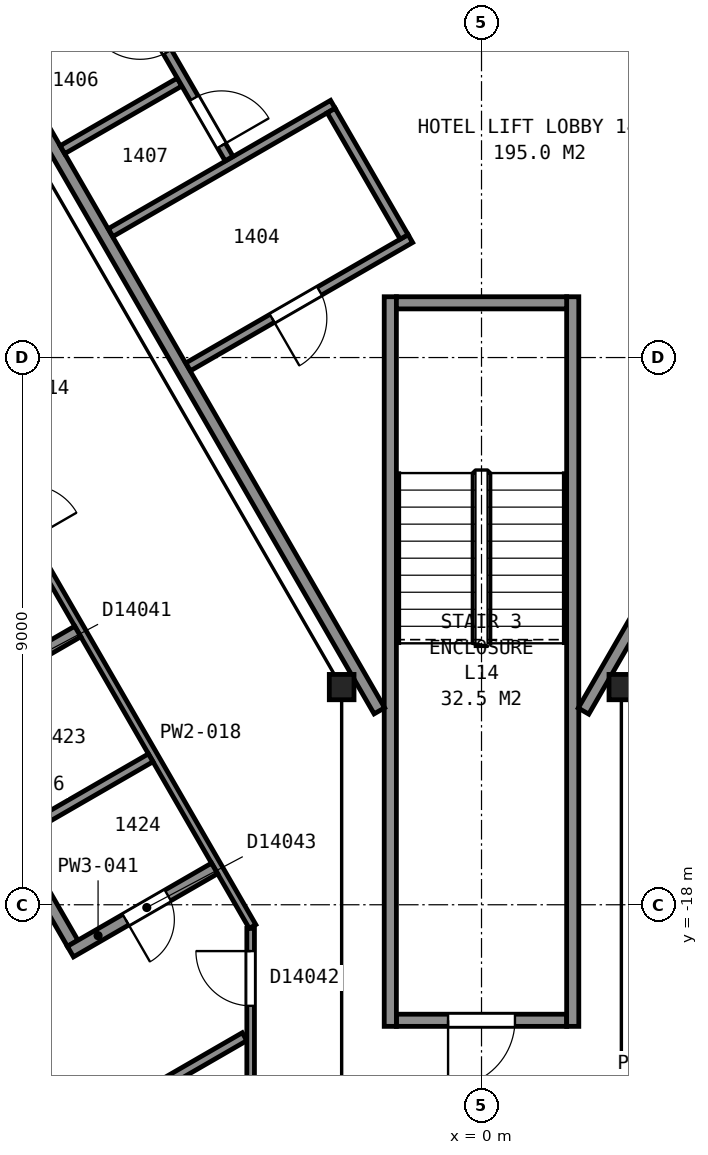
"""IFC4 building model, lengths in metres.
Left out: names, types, materials, properties, quantities, classifications, styles, units other than length and angle.
Written with IfcOpenShell. Run it as: python <this file> out.ifc"""

import sys

from ifc_helpers import new_model, si_unit, direction, frame, frame_2d, origin, origin_2d, place, context, subcontext, project, spatial, rectangle, i_section, extrude, element, fill, save


model = new_model("IFC4")
c1 = context("Model", 3, precision=1e-05, world=origin(), true_north=direction((0.0, 1.0)))
c2 = subcontext(c1, "Body", "Model", "MODEL_VIEW")
j1 = project(units=[si_unit("LENGTHUNIT", "METRE"), si_unit("PLANEANGLEUNIT", "RADIAN")], contexts=[c1])
p1 = place(None, origin())
s1 = spatial("IfcSite", under=j1, at=p1, CompositionType="ELEMENT")
p2 = place(p1, origin())
s2 = spatial("IfcBuilding", under=s1, at=p2, CompositionType="ELEMENT")
p3 = place(p2, frame((0.0, 0.0, 65.6)))
s3 = spatial("IfcBuildingStorey", under=s2, at=p3, CompositionType="ELEMENT", Elevation=65.6)
for number, where, z_axis, x_axis in (
    (1, (-2.3, -14.42, 0.0), (0.0, 0.0, 1.0), (1.0, 0.0, 0.0)),
    (2, (2.3, -14.42, 0.0), (0.0, 0.0, 1.0), (1.0, 0.0, 0.0)),
):
    element("IfcColumn", number, at=place(p3, frame(where, z_axis=z_axis, x_axis=x_axis)), inside=s3, PredefinedType="COLUMN", context=c2, shape_type="SweptSolid", body=[
        extrude(i_section(OverallWidth=0.406, OverallDepth=0.417, WebThickness=0.03, FlangeThickness=0.048, FilletRadius=0.015, at=origin_2d()), origin(), (0.0, 0.0, 1.0), 3.6),
    ])
p4 = place(p3, frame((-1.4, -19.9, 0.0), z_axis=(0.0, 0.0, 1.0), x_axis=(1.0, 0.0, 0.0)))
e3 = element("IfcWall", 3, at=p4, inside=s3, PredefinedType="PARTITIONING", context=c2, shape_type="SweptSolid", body=[
    extrude(rectangle(XDim=2.8, YDim=0.2, at=frame_2d((1.4, 0.0))), origin(), (0.0, 0.0, 1.0), 3.35),
])
p5 = place(p4, frame((0.85, 0.0, 0.0)))
e4 = element("IfcOpeningElement", 4, at=p5, cuts=e3, PredefinedType="OPENING", context=c2, shape_type="SweptSolid", body=[
    extrude(rectangle(XDim=1.1, YDim=2.1, at=frame_2d((0.55, 1.05))), frame((0.0, 0.11, 0.0), z_axis=(0.0, -1.0, 0.0), x_axis=(1.0, 0.0, 0.0)), (0.0, 0.0, 1.0), 0.22),
])
for number, where, z_axis, x_axis in (
    (5, (1.5, -8.0, 0.0), (0.0, 0.0, 1.0), (0.0, -1.0, 0.0)),
    (6, (-1.5, -8.0, 0.0), (0.0, 0.0, 1.0), (0.0, -1.0, 0.0)),
):
    element("IfcWall", number, at=place(p3, frame(where, z_axis=z_axis, x_axis=x_axis)), inside=s3, PredefinedType="PARTITIONING", context=c2, shape_type="SweptSolid", body=[
        extrude(rectangle(XDim=12.0, YDim=0.2, at=frame_2d((6.0, 0.0))), origin(), (0.0, 0.0, 1.0), 3.35),
    ])
p6 = place(p3, frame((-1.4, -8.1, 0.0), z_axis=(0.0, 0.0, 1.0), x_axis=(1.0, 0.0, 0.0)))
e7 = element("IfcWall", 7, at=p6, inside=s3, PredefinedType="PARTITIONING", context=c2, shape_type="SweptSolid", body=[
    extrude(rectangle(XDim=2.8, YDim=0.2, at=frame_2d((1.4, 0.0))), origin(), (0.0, 0.0, 1.0), 3.35),
])
p7 = place(p3, frame((-13.664, 5.946, 0.0), z_axis=(0.0, 0.0, 1.0), x_axis=(0.499994327219, -0.866028678941, 0.0)))
e8 = element("IfcWall", 8, at=p7, inside=s3, PredefinedType="PARTITIONING", context=c2, shape_type="SweptSolid", body=[
    extrude(rectangle(XDim=23.968, YDim=0.2, at=frame_2d((11.984, 0.0))), origin(), (0.0, 0.0, 1.0), 3.35),
])
p8 = place(p3, frame((-7.856, -3.912, 0.0), z_axis=(0.0, 0.0, 1.0), x_axis=(0.865971748, 0.500092923031, 0.0)))
e9 = element("IfcWall", 9, at=p8, inside=s3, PredefinedType="PARTITIONING", context=c2, shape_type="SweptSolid", body=[
    extrude(rectangle(XDim=2.225, YDim=0.15, at=frame_2d((1.112, 0.0))), origin(), (0.0, 0.0, 1.0), 3.35),
])
p9 = place(p3, frame((-6.892, -5.582, 0.0), z_axis=(0.0, 0.0, 1.0), x_axis=(0.865944298464, 0.500140452231, 0.0)))
e10 = element("IfcWall", 10, at=p9, inside=s3, PredefinedType="PARTITIONING", context=c2, shape_type="SweptSolid", body=[
    extrude(rectangle(XDim=2.224, YDim=0.15, at=frame_2d((1.112, 0.0))), origin(), (0.0, 0.0, 1.0), 3.35),
])
p10 = place(p3, frame((-6.1, -6.946, 0.0), z_axis=(0.0, 0.0, 1.0), x_axis=(0.866038200431, 0.499977834903, 0.0)))
e11 = element("IfcWall", 11, at=p10, inside=s3, PredefinedType="PARTITIONING", context=c2, shape_type="SweptSolid", body=[
    extrude(rectangle(XDim=4.22, YDim=0.15, at=frame_2d((2.11, 0.0))), origin(), (0.0, 0.0, 1.0), 3.35),
])
p11 = place(p3, frame((-4.152, -5.729, 0.0), z_axis=(0.0, 0.0, 1.0), x_axis=(-0.500024287448, 0.866011380966, 0.0)))
e12 = element("IfcWall", 12, at=p11, inside=s3, PredefinedType="PARTITIONING", context=c2, shape_type="SweptSolid", body=[
    extrude(rectangle(XDim=3.501, YDim=0.15, at=frame_2d((1.75, 0.0))), origin(), (0.0, 0.0, 1.0), 3.35),
])
p12 = place(p11, frame((2.026, 0.0, 0.0)))
e13 = element("IfcOpeningElement", 13, at=p12, cuts=e12, PredefinedType="OPENING", context=c2, shape_type="SweptSolid", body=[
    extrude(rectangle(XDim=0.9, YDim=2.1, at=frame_2d((0.45, 1.05))), frame((0.0, 0.085, 0.0), z_axis=(0.0, -1.0, 0.0), x_axis=(1.0, 0.0, 0.0)), (0.0, 0.0, 1.0), 0.17),
])
p13 = place(p11, frame((0.248, 0.0, 0.0)))
e14 = element("IfcOpeningElement", 14, at=p13, cuts=e12, PredefinedType="OPENING", context=c2, shape_type="SweptSolid", body=[
    extrude(rectangle(XDim=0.9, YDim=2.1, at=frame_2d((0.45, 1.05))), frame((0.0, 0.085, 0.0), z_axis=(0.0, -1.0, 0.0), x_axis=(1.0, 0.0, 0.0)), (0.0, 0.0, 1.0), 0.17),
])
p14 = place(p3, frame((-4.825, -9.154, 0.0), z_axis=(0.0, 0.0, 1.0), x_axis=(0.866023738697, 0.500002884005, 0.0)))
e15 = element("IfcWall", 15, at=p14, inside=s3, PredefinedType="PARTITIONING", context=c2, shape_type="SweptSolid", body=[
    extrude(rectangle(XDim=4.22, YDim=0.15, at=frame_2d((2.11, 0.0))), origin(), (0.0, 0.0, 1.0), 3.35),
])
p15 = place(p14, frame((1.595, 0.0, 0.0)))
e16 = element("IfcOpeningElement", 16, at=p15, cuts=e15, PredefinedType="OPENING", context=c2, shape_type="SweptSolid", body=[
    extrude(rectangle(XDim=0.9, YDim=2.1, at=frame_2d((0.45, 1.05))), frame((0.0, 0.085, 0.0), z_axis=(0.0, -1.0, 0.0), x_axis=(1.0, 0.0, 0.0)), (0.0, 0.0, 1.0), 0.17),
])
p16 = place(p3, frame((-2.472, -4.938, 0.0), z_axis=(0.0, 0.0, 1.0), x_axis=(0.500045362686, -0.865999212041, 0.0)))
e17 = element("IfcWall", 17, at=p16, inside=s3, PredefinedType="PARTITIONING", context=c2, shape_type="SweptSolid", body=[
    extrude(rectangle(XDim=2.4, YDim=0.15, at=frame_2d((1.2, 0.0))), origin(), (0.0, 0.0, 1.0), 3.35),
])
p17 = place(p3, frame((1.677, -14.815, 0.0), z_axis=(0.0, 0.0, 1.0), x_axis=(0.49999445743, 0.866028603765, 0.0)))
e18 = element("IfcWall", 18, at=p17, inside=s3, PredefinedType="PARTITIONING", context=c2, shape_type="SweptSolid", body=[
    extrude(rectangle(XDim=5.905, YDim=0.2, at=frame_2d((2.952, 0.0))), origin(), (0.0, 0.0, 1.0), 3.35),
])
p18 = place(p17, frame((3.855, 0.0, 0.0)))
e19 = element("IfcOpeningElement", 19, at=p18, cuts=e18, PredefinedType="OPENING", context=c2, shape_type="SweptSolid", body=[
    extrude(rectangle(XDim=1.8, YDim=2.1, at=frame_2d((0.9, 1.05))), frame((0.0, 0.11, 0.0), z_axis=(0.0, -1.0, 0.0), x_axis=(1.0, 0.0, 0.0)), (0.0, 0.0, 1.0), 0.22),
])
p19 = place(p3, frame((-3.766, -18.358, 0.0), z_axis=(0.0, 0.0, 1.0), x_axis=(-0.500003973642, 0.866023109589, 0.0)))
e20 = element("IfcWall", 20, at=p19, inside=s3, PredefinedType="PARTITIONING", context=c2, shape_type="SweptSolid", body=[
    extrude(rectangle(XDim=28.826, YDim=0.125, at=frame_2d((14.413, 0.0))), origin(), (0.0, 0.0, 1.0), 2.613),
])
p20 = place(p19, frame((27.114, 0.0, 0.0)))
e21 = element("IfcOpeningElement", 21, at=p20, cuts=e20, PredefinedType="OPENING", context=c2, shape_type="SweptSolid", body=[
    extrude(rectangle(XDim=0.9, YDim=2.1, at=frame_2d((0.45, 1.05))), frame((0.0, 0.073, 0.0), z_axis=(0.0, -1.0, 0.0), x_axis=(1.0, 0.0, 0.0)), (0.0, 0.0, 1.0), 0.145),
])
p21 = place(p19, frame((20.322, 0.0, 0.0)))
e22 = element("IfcOpeningElement", 22, at=p21, cuts=e20, PredefinedType="OPENING", context=c2, shape_type="SweptSolid", body=[
    extrude(rectangle(XDim=0.9, YDim=2.1, at=frame_2d((0.45, 1.05))), frame((0.0, 0.073, 0.0), z_axis=(0.0, -1.0, 0.0), x_axis=(1.0, 0.0, 0.0)), (0.0, 0.0, 1.0), 0.145),
])
p22 = place(p19, frame((17.68, 0.0, 0.0)))
e23 = element("IfcOpeningElement", 23, at=p22, cuts=e20, PredefinedType="OPENING", context=c2, shape_type="SweptSolid", body=[
    extrude(rectangle(XDim=0.9, YDim=2.1, at=frame_2d((0.45, 1.05))), frame((0.0, 0.073, 0.0), z_axis=(0.0, -1.0, 0.0), x_axis=(1.0, 0.0, 0.0)), (0.0, 0.0, 1.0), 0.145),
])
p23 = place(p19, frame((10.836, 0.0, 0.0)))
e24 = element("IfcOpeningElement", 24, at=p23, cuts=e20, PredefinedType="OPENING", context=c2, shape_type="SweptSolid", body=[
    extrude(rectangle(XDim=0.9, YDim=2.1, at=frame_2d((0.45, 1.05))), frame((0.0, 0.073, 0.0), z_axis=(0.0, -1.0, 0.0), x_axis=(1.0, 0.0, 0.0)), (0.0, 0.0, 1.0), 0.145),
])
p24 = place(p19, frame((7.342, 0.0, 0.0)))
e25 = element("IfcOpeningElement", 25, at=p24, cuts=e20, PredefinedType="OPENING", context=c2, shape_type="SweptSolid", body=[
    extrude(rectangle(XDim=0.9, YDim=2.1, at=frame_2d((0.45, 1.05))), frame((0.0, 0.073, 0.0), z_axis=(0.0, -1.0, 0.0), x_axis=(1.0, 0.0, 0.0)), (0.0, 0.0, 1.0), 0.145),
])
p25 = place(p3, frame((-12.794, -19.829, 0.0), z_axis=(0.0, 0.0, 1.0), x_axis=(0.866024716685, 0.500001190089, 0.0)))
e26 = element("IfcWall", 26, at=p25, inside=s3, PredefinedType="PARTITIONING", context=c2, shape_type="SweptSolid", body=[
    extrude(rectangle(XDim=8.492, YDim=0.15, at=frame_2d((4.246, 0.0))), origin(), (0.0, 0.0, 1.0), 2.613),
])
p26 = place(p3, frame((-10.423, -23.937, 0.0), z_axis=(0.0, 0.0, 1.0), x_axis=(0.866039368072, 0.499975812365, 0.0)))
e27 = element("IfcWall", 27, at=p26, inside=s3, PredefinedType="PARTITIONING", context=c2, shape_type="SweptSolid", body=[
    extrude(rectangle(XDim=7.535, YDim=0.15, at=frame_2d((3.768, 0.0))), origin(), (0.0, 0.0, 1.0), 2.613),
])
p27 = place(p3, frame((-6.64, -13.505, 0.0), z_axis=(0.0, 0.0, 1.0), x_axis=(-0.866038344573, -0.499977585228, 0.0)))
e28 = element("IfcWall", 28, at=p27, inside=s3, PredefinedType="PARTITIONING", context=c2, shape_type="SweptSolid", body=[
    extrude(rectangle(XDim=3.037, YDim=0.2, at=frame_2d((1.519, 0.0))), origin(), (0.0, 0.0, 1.0), 2.613),
])
p28 = place(p27, frame((1.037, 0.0, 0.0)))
e29 = element("IfcOpeningElement", 29, at=p28, cuts=e28, PredefinedType="OPENING", context=c2, shape_type="SweptSolid", body=[
    extrude(rectangle(XDim=0.8, YDim=2.1, at=frame_2d((0.4, 1.05))), frame((0.0, 0.11, 0.0), z_axis=(0.0, -1.0, 0.0), x_axis=(1.0, 0.0, 0.0)), (0.0, 0.0, 1.0), 0.22),
])
p29 = place(p3, frame((-7.687, -16.967, 0.0), z_axis=(0.0, 0.0, 1.0), x_axis=(0.500026156197, -0.86601030197, 0.0)))
e30 = element("IfcWall", 30, at=p29, inside=s3, PredefinedType="PARTITIONING", context=c2, shape_type="SweptSolid", body=[
    extrude(rectangle(XDim=1.925, YDim=0.2, at=frame_2d((0.963, 0.0))), origin(), (0.0, 0.0, 1.0), 2.613),
])
p30 = place(p3, frame((-6.76, -18.771, 0.0), z_axis=(0.0, 0.0, 1.0), x_axis=(0.866005850709, 0.50003386539, 0.0)))
e31 = element("IfcWall", 31, at=p30, inside=s3, PredefinedType="PARTITIONING", context=c2, shape_type="SweptSolid", body=[
    extrude(rectangle(XDim=2.737, YDim=0.2, at=frame_2d((1.369, 0.0))), origin(), (0.0, 0.0, 1.0), 2.613),
])
p31 = place(p30, frame((1.05, 0.0, 0.0)))
e32 = element("IfcOpeningElement", 32, at=p31, cuts=e31, PredefinedType="OPENING", context=c2, shape_type="SweptSolid", body=[
    extrude(rectangle(XDim=0.8, YDim=2.1, at=frame_2d((0.4, 1.05))), frame((0.0, 0.11, 0.0), z_axis=(0.0, -1.0, 0.0), x_axis=(1.0, 0.0, 0.0)), (0.0, 0.0, 1.0), 0.22),
])
p32 = place(p3, frame((-3.797, -22.86, 0.0), z_axis=(0.0, 0.0, 1.0), x_axis=(0.0, 1.0, 0.0)))
e33 = element("IfcWall", 33, at=p32, inside=s3, PredefinedType="PARTITIONING", context=c2, shape_type="SweptSolid", body=[
    extrude(rectangle(XDim=4.471, YDim=0.125, at=frame_2d((2.235, 0.0))), origin(), (0.0, 0.0, 1.0), 2.613),
])
p33 = place(p32, frame((3.198, 0.0, 0.0)))
e34 = element("IfcOpeningElement", 34, at=p33, cuts=e33, PredefinedType="OPENING", context=c2, shape_type="SweptSolid", body=[
    extrude(rectangle(XDim=0.9, YDim=2.1, at=frame_2d((0.45, 1.05))), frame((0.0, 0.073, 0.0), z_axis=(0.0, -1.0, 0.0), x_axis=(1.0, 0.0, 0.0)), (0.0, 0.0, 1.0), 0.145),
])
p34 = place(p5, origin())
e35 = element("IfcDoor", 35, at=p34, inside=s3, OperationType="SINGLE_SWING_LEFT", PredefinedType="DOOR", context=c2, shape_type="SweptSolid", body=[
    extrude(rectangle(XDim=1.1, YDim=2.1, at=frame_2d((0.55, 1.05))), frame((0.0, 0.025, 0.0), z_axis=(0.0, -1.0, 0.0), x_axis=(1.0, 0.0, 0.0)), (0.0, 0.0, 1.0), 0.05),
])
fill(e4, e35)
p35 = place(p12, origin())
e36 = element("IfcDoor", 36, at=p35, inside=s3, OperationType="SINGLE_SWING_RIGHT", PredefinedType="DOOR", context=c2, shape_type="SweptSolid", body=[
    extrude(rectangle(XDim=0.9, YDim=2.1, at=frame_2d((0.45, 1.05))), frame((0.0, 0.025, 0.0), z_axis=(0.0, -1.0, 0.0), x_axis=(1.0, 0.0, 0.0)), (0.0, 0.0, 1.0), 0.05),
])
fill(e13, e36)
p36 = place(p13, origin())
e37 = element("IfcDoor", 37, at=p36, inside=s3, OperationType="SINGLE_SWING_LEFT", PredefinedType="DOOR", context=c2, shape_type="SweptSolid", body=[
    extrude(rectangle(XDim=0.9, YDim=2.1, at=frame_2d((0.45, 1.05))), frame((0.0, 0.025, 0.0), z_axis=(0.0, -1.0, 0.0), x_axis=(1.0, 0.0, 0.0)), (0.0, 0.0, 1.0), 0.05),
])
fill(e14, e37)
p37 = place(p15, origin())
e38 = element("IfcDoor", 38, at=p37, inside=s3, OperationType="SINGLE_SWING_LEFT", PredefinedType="DOOR", context=c2, shape_type="SweptSolid", body=[
    extrude(rectangle(XDim=0.9, YDim=2.1, at=frame_2d((0.45, 1.05))), frame((0.0, 0.025, 0.0), z_axis=(0.0, -1.0, 0.0), x_axis=(1.0, 0.0, 0.0)), (0.0, 0.0, 1.0), 0.05),
])
fill(e16, e38)
p38 = place(p31, origin())
e39 = element("IfcDoor", 39, at=p38, inside=s3, OperationType="SINGLE_SWING_LEFT", PredefinedType="DOOR", context=c2, shape_type="SweptSolid", body=[
    extrude(rectangle(XDim=0.8, YDim=2.1, at=frame_2d((0.4, 1.05))), frame((0.0, 0.025, 0.0), z_axis=(0.0, -1.0, 0.0), x_axis=(1.0, 0.0, 0.0)), (0.0, 0.0, 1.0), 0.05),
])
fill(e32, e39)
p39 = place(p33, origin())
e40 = element("IfcDoor", 40, at=p39, inside=s3, OperationType="SINGLE_SWING_RIGHT", PredefinedType="DOOR", context=c2, shape_type="SweptSolid", body=[
    extrude(rectangle(XDim=0.9, YDim=2.1, at=frame_2d((0.45, 1.05))), frame((0.0, 0.025, 0.0), z_axis=(0.0, -1.0, 0.0), x_axis=(1.0, 0.0, 0.0)), (0.0, 0.0, 1.0), 0.05),
])
fill(e34, e40)
save(model, sys.argv[1])
